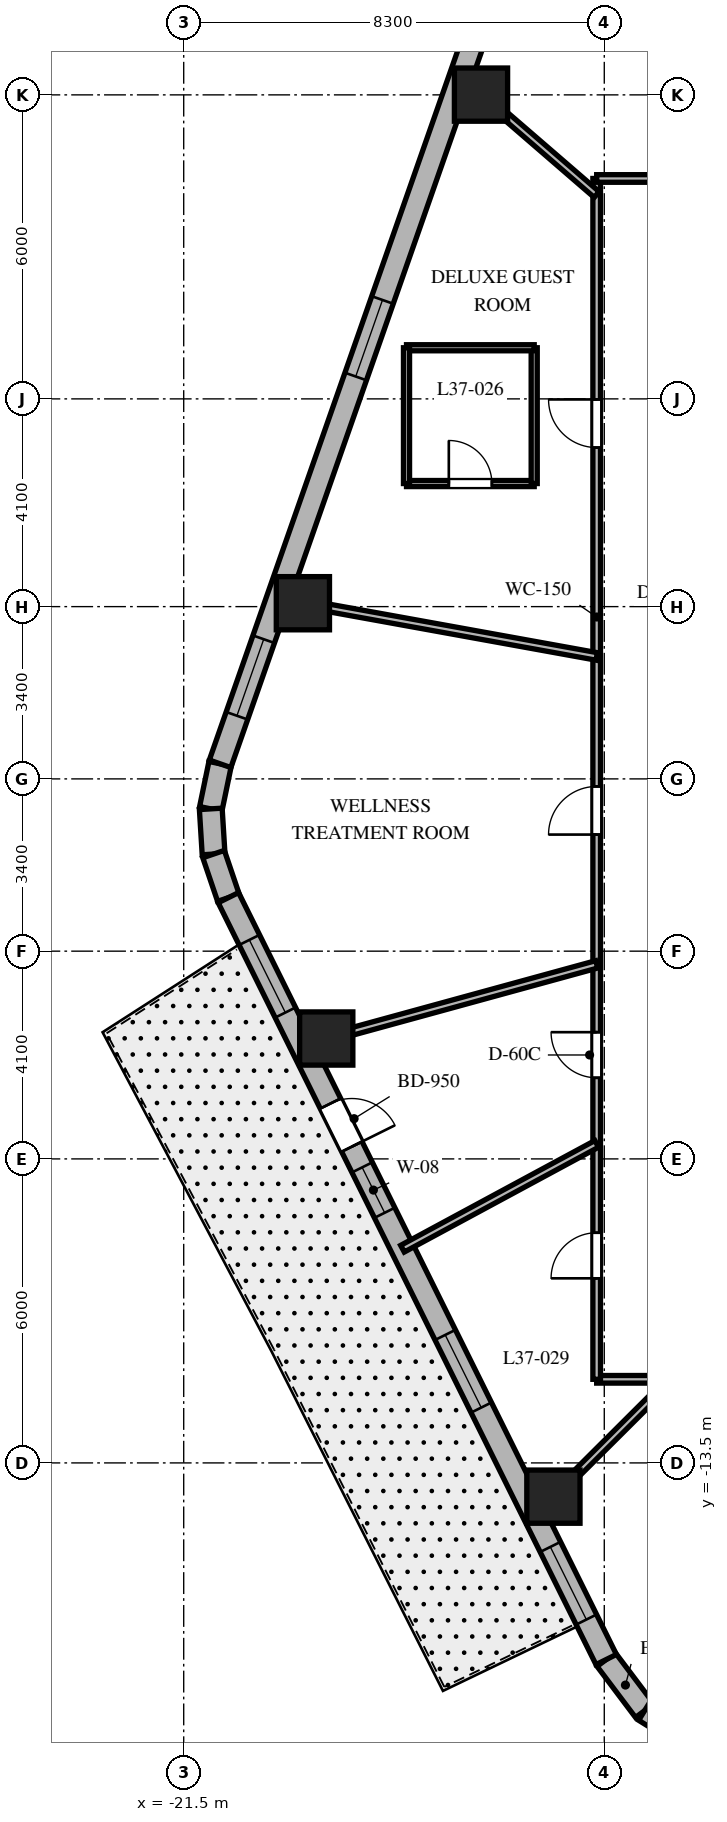
"""IFC4 building model, lengths in metres.
Left out: names, types, materials, properties, quantities, classifications, styles, units other than length and angle.
Written with IfcOpenShell. Run it as: python <this file> out.ifc"""

import sys

from ifc_helpers import new_model, si_unit, direction, frame, frame_2d, origin, origin_2d, place, context, subcontext, project, spatial, rectangle, extrude, element, fill, save


model = new_model("IFC4")
c1 = context("Model", 3, precision=1e-05, world=origin(), true_north=direction((0.0, 1.0)))
c2 = subcontext(c1, "Body", "Model", "MODEL_VIEW")
j1 = project(units=[si_unit("LENGTHUNIT", "METRE"), si_unit("PLANEANGLEUNIT", "RADIAN")], contexts=[c1])
p1 = place(None, origin())
s1 = spatial("IfcSite", under=j1, at=p1, CompositionType="ELEMENT")
p2 = place(p1, origin())
s2 = spatial("IfcBuilding", under=s1, at=p2, CompositionType="ELEMENT")
p3 = place(p2, frame((0.0, 0.0, 151.7)))
s3 = spatial("IfcBuildingStorey", under=s2, at=p3, CompositionType="ELEMENT", Elevation=151.7)
for number, where, z_axis, x_axis in (
    (1, (-15.633, 13.505, 0.0), (0.0, 0.0, 1.0), (1.0, 0.0, 0.0)),
    (2, (-19.148, 3.467, 0.0), (0.0, 0.0, 1.0), (1.0, 0.0, 0.0)),
    (3, (-18.687, -5.124, 0.0), (0.0, 0.0, 1.0), (1.0, 0.0, 0.0)),
    (4, (-14.204, -14.166, 0.0), (0.0, 0.0, 1.0), (1.0, 0.0, 0.0)),
):
    element("IfcColumn", number, at=place(p3, frame(where, z_axis=z_axis, x_axis=x_axis)), inside=s3, PredefinedType="COLUMN", context=c2, shape_type="SweptSolid", body=[
        extrude(rectangle(XDim=1.05, YDim=1.05, at=origin_2d()), origin(), (0.0, 0.0, 1.0), 3.7),
    ])
p4 = place(p3, frame((-13.162, -17.381, 0.0), z_axis=(0.0, 0.0, 1.0), x_axis=(0.601515770517, -0.798860925205, 0.0)))
e5 = element("IfcWall", 5, at=p4, inside=s3, PredefinedType="SOLIDWALL", context=c2, shape_type="SweptSolid", body=[
    extrude(rectangle(XDim=1.262, YDim=0.45, at=frame_2d((0.631, 0.0))), origin(), (0.0, 0.0, 1.0), 3.4),
])
p5 = place(p3, frame((-12.403, -18.389, 0.0), z_axis=(0.0, 0.0, 1.0), x_axis=(0.849795170926, -0.527113049991, 0.0)))
e6 = element("IfcWall", 6, at=p5, inside=s3, PredefinedType="SOLIDWALL", context=c2, shape_type="SweptSolid", body=[
    extrude(rectangle(XDim=1.241, YDim=0.45, at=frame_2d((0.62, 0.0))), origin(), (0.0, 0.0, 1.0), 3.4),
])
p6 = place(p3, frame((-20.782, 0.298, 0.0), z_axis=(0.0, 0.0, 1.0), x_axis=(-0.202570068411, -0.979267771033, 0.0)))
e7 = element("IfcWall", 7, at=p6, inside=s3, PredefinedType="SOLIDWALL", context=c2, shape_type="SweptSolid", body=[
    extrude(rectangle(XDim=0.909, YDim=0.45, at=frame_2d((0.454, 0.0))), origin(), (0.0, 0.0, 1.0), 3.4),
])
p7 = place(p3, frame((-20.966, -0.592, 0.0), z_axis=(0.0, 0.0, 1.0), x_axis=(0.061748898935, -0.998091715966, 0.0)))
e8 = element("IfcWall", 8, at=p7, inside=s3, PredefinedType="SOLIDWALL", context=c2, shape_type="SweptSolid", body=[
    extrude(rectangle(XDim=0.894, YDim=0.45, at=frame_2d((0.447, 0.0))), origin(), (0.0, 0.0, 1.0), 3.4),
])
p8 = place(p3, frame((-20.911, -1.484, 0.0), z_axis=(0.0, 0.0, 1.0), x_axis=(0.321623334353, -0.946867694453, 0.0)))
e9 = element("IfcWall", 9, at=p8, inside=s3, PredefinedType="SOLIDWALL", context=c2, shape_type="SweptSolid", body=[
    extrude(rectangle(XDim=0.909, YDim=0.45, at=frame_2d((0.454, 0.0))), origin(), (0.0, 0.0, 1.0), 3.4),
])
p9 = place(p3, frame((-14.937, 16.993, 0.0), z_axis=(0.0, 0.0, 1.0), x_axis=(-0.330431575061, -0.943829949834, 0.0)))
e10 = element("IfcWall", 10, at=p9, inside=s3, PredefinedType="SOLIDWALL", context=c2, shape_type="SweptSolid", body=[
    extrude(rectangle(XDim=17.689, YDim=0.45, at=frame_2d((8.844, 0.0))), origin(), (0.0, 0.0, 1.0), 3.4),
])
p10 = place(p9, frame((0.95, 0.0, 0.8)))
e11 = element("IfcOpeningElement", 11, at=p10, cuts=e10, PredefinedType="OPENING", context=c2, shape_type="SweptSolid", body=[
    extrude(rectangle(XDim=1.6, YDim=1.75, at=frame_2d((0.8, 0.875))), frame((0.0, 0.235, 0.0), z_axis=(0.0, -1.0, 0.0), x_axis=(1.0, 0.0, 0.0)), (0.0, 0.0, 1.0), 0.47),
])
p11 = place(p9, frame((7.99, 0.0, 0.8)))
e12 = element("IfcOpeningElement", 12, at=p11, cuts=e10, PredefinedType="OPENING", context=c2, shape_type="SweptSolid", body=[
    extrude(rectangle(XDim=1.6, YDim=1.75, at=frame_2d((0.8, 0.875))), frame((0.0, 0.235, 0.0), z_axis=(0.0, -1.0, 0.0), x_axis=(1.0, 0.0, 0.0)), (0.0, 0.0, 1.0), 0.47),
])
p12 = place(p9, frame((15.084, 0.0, 0.8)))
e13 = element("IfcOpeningElement", 13, at=p12, cuts=e10, PredefinedType="OPENING", context=c2, shape_type="SweptSolid", body=[
    extrude(rectangle(XDim=1.6, YDim=1.75, at=frame_2d((0.8, 0.875))), frame((0.0, 0.235, 0.0), z_axis=(0.0, -1.0, 0.0), x_axis=(1.0, 0.0, 0.0)), (0.0, 0.0, 1.0), 0.47),
])
p13 = place(p3, frame((-20.618, -2.344, 0.0), z_axis=(0.0, 0.0, 1.0), x_axis=(0.444243691097, -0.895905990002, 0.0)))
e14 = element("IfcWall", 14, at=p13, inside=s3, PredefinedType="SOLIDWALL", context=c2, shape_type="SweptSolid", body=[
    extrude(rectangle(XDim=16.784, YDim=0.45, at=frame_2d((8.392, 0.0))), origin(), (0.0, 0.0, 1.0), 3.4),
])
p14 = place(p13, frame((4.535, 0.0, 0.0)))
e15 = element("IfcOpeningElement", 15, at=p14, cuts=e14, PredefinedType="OPENING", context=c2, shape_type="SweptSolid", body=[
    extrude(rectangle(XDim=0.95, YDim=2.15, at=frame_2d((0.475, 1.075))), frame((0.0, 0.235, 0.0), z_axis=(0.0, -1.0, 0.0), x_axis=(1.0, 0.0, 0.0)), (0.0, 0.0, 1.0), 0.47),
])
p15 = place(p13, frame((0.931, 0.0, 0.8)))
e16 = element("IfcOpeningElement", 16, at=p15, cuts=e14, PredefinedType="OPENING", context=c2, shape_type="SweptSolid", body=[
    extrude(rectangle(XDim=1.6, YDim=1.75, at=frame_2d((0.8, 0.875))), frame((0.0, 0.235, 0.0), z_axis=(0.0, -1.0, 0.0), x_axis=(1.0, 0.0, 0.0)), (0.0, 0.0, 1.0), 0.47),
])
p16 = place(p13, frame((5.942, 0.0, 0.8)))
e17 = element("IfcOpeningElement", 17, at=p16, cuts=e14, PredefinedType="OPENING", context=c2, shape_type="SweptSolid", body=[
    extrude(rectangle(XDim=1.0, YDim=1.65, at=frame_2d((0.5, 0.825))), frame((0.0, 0.235, 0.0), z_axis=(0.0, -1.0, 0.0), x_axis=(1.0, 0.0, 0.0)), (0.0, 0.0, 1.0), 0.47),
])
p17 = place(p13, frame((9.633, 0.0, 0.8)))
e18 = element("IfcOpeningElement", 18, at=p17, cuts=e14, PredefinedType="OPENING", context=c2, shape_type="SweptSolid", body=[
    extrude(rectangle(XDim=1.6, YDim=1.75, at=frame_2d((0.8, 0.875))), frame((0.0, 0.235, 0.0), z_axis=(0.0, -1.0, 0.0), x_axis=(1.0, 0.0, 0.0)), (0.0, 0.0, 1.0), 0.47),
])
p18 = place(p13, frame((14.303, 0.0, 0.8)))
e19 = element("IfcOpeningElement", 19, at=p18, cuts=e14, PredefinedType="OPENING", context=c2, shape_type="SweptSolid", body=[
    extrude(rectangle(XDim=1.6, YDim=1.75, at=frame_2d((0.8, 0.875))), frame((0.0, 0.235, 0.0), z_axis=(0.0, -1.0, 0.0), x_axis=(1.0, 0.0, 0.0)), (0.0, 0.0, 1.0), 0.47),
])
p19 = place(p3, frame((13.35, -11.85, 0.0), z_axis=(0.0, 0.0, 1.0), x_axis=(-1.0, 0.0, 0.0)))
e20 = element("IfcWall", 20, at=p19, inside=s3, PredefinedType="PARTITIONING", context=c2, shape_type="SweptSolid", body=[
    extrude(rectangle(XDim=26.7, YDim=0.15, at=frame_2d((13.35, 0.0))), origin(), (0.0, 0.0, 1.0), 2.84),
])
p20 = place(p19, frame((20.682, 0.0, 0.0)))
e21 = element("IfcOpeningElement", 21, at=p20, cuts=e20, PredefinedType="OPENING", context=c2, shape_type="SweptSolid", body=[
    extrude(rectangle(XDim=0.95, YDim=2.03, at=frame_2d((0.475, 1.015))), frame((0.0, 0.085, 0.0), z_axis=(0.0, -1.0, 0.0), x_axis=(1.0, 0.0, 0.0)), (0.0, 0.0, 1.0), 0.17),
])
p21 = place(p19, frame((12.362, 0.0, 0.0)))
e22 = element("IfcOpeningElement", 22, at=p21, cuts=e20, PredefinedType="OPENING", context=c2, shape_type="SweptSolid", body=[
    extrude(rectangle(XDim=0.95, YDim=2.03, at=frame_2d((0.475, 1.015))), frame((0.0, 0.085, 0.0), z_axis=(0.0, -1.0, 0.0), x_axis=(1.0, 0.0, 0.0)), (0.0, 0.0, 1.0), 0.17),
])
p22 = place(p19, frame((3.995, 0.0, 0.0)))
e23 = element("IfcOpeningElement", 23, at=p22, cuts=e20, PredefinedType="OPENING", context=c2, shape_type="SweptSolid", body=[
    extrude(rectangle(XDim=0.95, YDim=2.03, at=frame_2d((0.475, 1.015))), frame((0.0, 0.085, 0.0), z_axis=(0.0, -1.0, 0.0), x_axis=(1.0, 0.0, 0.0)), (0.0, 0.0, 1.0), 0.17),
])
p23 = place(p3, frame((-13.35, -11.85, 0.0), z_axis=(0.0, 0.0, 1.0), x_axis=(0.0, 1.0, 0.0)))
e24 = element("IfcWall", 24, at=p23, inside=s3, PredefinedType="PARTITIONING", context=c2, shape_type="SweptSolid", body=[
    extrude(rectangle(XDim=23.7, YDim=0.15, at=frame_2d((11.85, 0.0))), origin(), (0.0, 0.0, 1.0), 2.84),
])
p24 = place(p23, frame((18.389, 0.0, 0.0)))
e25 = element("IfcOpeningElement", 25, at=p24, cuts=e24, PredefinedType="OPENING", context=c2, shape_type="SweptSolid", body=[
    extrude(rectangle(XDim=0.95, YDim=2.03, at=frame_2d((0.475, 1.015))), frame((0.0, 0.085, 0.0), z_axis=(0.0, -1.0, 0.0), x_axis=(1.0, 0.0, 0.0)), (0.0, 0.0, 1.0), 0.17),
])
p25 = place(p23, frame((10.751, 0.0, 0.0)))
e26 = element("IfcOpeningElement", 26, at=p25, cuts=e24, PredefinedType="OPENING", context=c2, shape_type="SweptSolid", body=[
    extrude(rectangle(XDim=0.95, YDim=2.03, at=frame_2d((0.475, 1.015))), frame((0.0, 0.085, 0.0), z_axis=(0.0, -1.0, 0.0), x_axis=(1.0, 0.0, 0.0)), (0.0, 0.0, 1.0), 0.17),
])
p26 = place(p23, frame((5.951, 0.0, 0.0)))
e27 = element("IfcOpeningElement", 27, at=p26, cuts=e24, PredefinedType="OPENING", context=c2, shape_type="SweptSolid", body=[
    extrude(rectangle(XDim=0.9, YDim=2.03, at=frame_2d((0.45, 1.015))), frame((0.0, 0.085, 0.0), z_axis=(0.0, -1.0, 0.0), x_axis=(1.0, 0.0, 0.0)), (0.0, 0.0, 1.0), 0.17),
])
p27 = place(p23, frame((1.993, 0.0, 0.0)))
e28 = element("IfcOpeningElement", 28, at=p27, cuts=e24, PredefinedType="OPENING", context=c2, shape_type="SweptSolid", body=[
    extrude(rectangle(XDim=0.9, YDim=2.03, at=frame_2d((0.45, 1.015))), frame((0.0, 0.085, 0.0), z_axis=(0.0, -1.0, 0.0), x_axis=(1.0, 0.0, 0.0)), (0.0, 0.0, 1.0), 0.17),
])
p28 = place(p3, frame((-13.35, 11.85, 0.0), z_axis=(0.0, 0.0, 1.0), x_axis=(1.0, 0.0, 0.0)))
e29 = element("IfcWall", 29, at=p28, inside=s3, PredefinedType="PARTITIONING", context=c2, shape_type="SweptSolid", body=[
    extrude(rectangle(XDim=26.7, YDim=0.15, at=frame_2d((13.35, 0.0))), origin(), (0.0, 0.0, 1.0), 2.84),
])
p29 = place(p28, frame((20.682, 0.0, 0.0)))
e30 = element("IfcOpeningElement", 30, at=p29, cuts=e29, PredefinedType="OPENING", context=c2, shape_type="SweptSolid", body=[
    extrude(rectangle(XDim=0.95, YDim=2.03, at=frame_2d((0.475, 1.015))), frame((0.0, 0.085, 0.0), z_axis=(0.0, -1.0, 0.0), x_axis=(1.0, 0.0, 0.0)), (0.0, 0.0, 1.0), 0.17),
])
p30 = place(p28, frame((14.229, 0.0, 0.0)))
e31 = element("IfcOpeningElement", 31, at=p30, cuts=e29, PredefinedType="OPENING", context=c2, shape_type="SweptSolid", body=[
    extrude(rectangle(XDim=0.95, YDim=2.03, at=frame_2d((0.475, 1.015))), frame((0.0, 0.085, 0.0), z_axis=(0.0, -1.0, 0.0), x_axis=(1.0, 0.0, 0.0)), (0.0, 0.0, 1.0), 0.17),
])
p31 = place(p28, frame((10.075, 0.0, 0.0)))
e32 = element("IfcOpeningElement", 32, at=p31, cuts=e29, PredefinedType="OPENING", context=c2, shape_type="SweptSolid", body=[
    extrude(rectangle(XDim=0.95, YDim=2.03, at=frame_2d((0.475, 1.015))), frame((0.0, 0.085, 0.0), z_axis=(0.0, -1.0, 0.0), x_axis=(1.0, 0.0, 0.0)), (0.0, 0.0, 1.0), 0.17),
])
p32 = place(p28, frame((3.995, 0.0, 0.0)))
e33 = element("IfcOpeningElement", 33, at=p32, cuts=e29, PredefinedType="OPENING", context=c2, shape_type="SweptSolid", body=[
    extrude(rectangle(XDim=0.95, YDim=2.03, at=frame_2d((0.475, 1.015))), frame((0.0, 0.085, 0.0), z_axis=(0.0, -1.0, 0.0), x_axis=(1.0, 0.0, 0.0)), (0.0, 0.0, 1.0), 0.17),
])
p33 = place(p3, frame((-13.35, 11.533, 0.0), z_axis=(0.0, 0.0, 1.0), x_axis=(-0.756711647314, 0.65374879183, 0.0)))
e34 = element("IfcWall", 34, at=p33, inside=s3, PredefinedType="PARTITIONING", context=c2, shape_type="SweptSolid", body=[
    extrude(rectangle(XDim=3.55, YDim=0.15, at=frame_2d((1.775, 0.0))), origin(), (0.0, 0.0, 1.0), 2.64),
])
p34 = place(p3, frame((-13.35, 2.417, 0.0), z_axis=(0.0, 0.0, 1.0), x_axis=(-0.98399796473, 0.178179699761, 0.0)))
e35 = element("IfcWall", 35, at=p34, inside=s3, PredefinedType="PARTITIONING", context=c2, shape_type="SweptSolid", body=[
    extrude(rectangle(XDim=6.393, YDim=0.15, at=frame_2d((3.197, 0.0))), origin(), (0.0, 0.0, 1.0), 2.64),
])
p35 = place(p3, frame((-13.35, -3.661, 0.0), z_axis=(0.0, 0.0, 1.0), x_axis=(-0.964397145454, -0.264458211898, 0.0)))
e36 = element("IfcWall", 36, at=p35, inside=s3, PredefinedType="PARTITIONING", context=c2, shape_type="SweptSolid", body=[
    extrude(rectangle(XDim=6.039, YDim=0.15, at=frame_2d((3.019, 0.0))), origin(), (0.0, 0.0, 1.0), 2.64),
])
p36 = place(p3, frame((-13.35, -7.204, 0.0), z_axis=(0.0, 0.0, 1.0), x_axis=(-0.880033329067, -0.474911928394, 0.0)))
e37 = element("IfcWall", 37, at=p36, inside=s3, PredefinedType="PARTITIONING", context=c2, shape_type="SweptSolid", body=[
    extrude(rectangle(XDim=4.355, YDim=0.15, at=frame_2d((2.178, 0.0))), origin(), (0.0, 0.0, 1.0), 2.64),
])
p37 = place(p3, frame((-11.882, -11.85, 0.0), z_axis=(0.0, 0.0, 1.0), x_axis=(-0.708037373639, -0.706174962407, 0.0)))
e38 = element("IfcWall", 38, at=p37, inside=s3, PredefinedType="PARTITIONING", context=c2, shape_type="SweptSolid", body=[
    extrude(rectangle(XDim=3.802, YDim=0.15, at=frame_2d((1.901, 0.0))), origin(), (0.0, 0.0, 1.0), 2.64),
])
p38 = place(p3, frame((-17.103, 5.829, 0.0), z_axis=(0.0, 0.0, 1.0), x_axis=(1.0, 0.0, 0.0)))
e39 = element("IfcWall", 39, at=p38, inside=s3, PredefinedType="PARTITIONING", context=c2, shape_type="SweptSolid", body=[
    extrude(rectangle(XDim=2.52, YDim=0.12, at=frame_2d((1.26, 0.0))), origin(), (0.0, 0.0, 1.0), 2.972),
])
p39 = place(p38, frame((0.835, 0.0, 0.0)))
e40 = element("IfcOpeningElement", 40, at=p39, cuts=e39, PredefinedType="OPENING", context=c2, shape_type="SweptSolid", body=[
    extrude(rectangle(XDim=0.85, YDim=2.03, at=frame_2d((0.425, 1.015))), frame((0.0, 0.07, 0.0), z_axis=(0.0, -1.0, 0.0), x_axis=(1.0, 0.0, 0.0)), (0.0, 0.0, 1.0), 0.14),
])
p40 = place(p3, frame((-14.583, 5.829, 0.0), z_axis=(0.0, 0.0, 1.0), x_axis=(0.0, 1.0, 0.0)))
e41 = element("IfcWall", 41, at=p40, inside=s3, PredefinedType="PARTITIONING", context=c2, shape_type="SweptSolid", body=[
    extrude(rectangle(XDim=2.68, YDim=0.12, at=frame_2d((1.34, 0.0))), origin(), (0.0, 0.0, 1.0), 2.972),
])
p41 = place(p3, frame((-14.583, 8.509, 0.0), z_axis=(0.0, 0.0, 1.0), x_axis=(-1.0, 0.0, 0.0)))
e42 = element("IfcWall", 42, at=p41, inside=s3, PredefinedType="PARTITIONING", context=c2, shape_type="SweptSolid", body=[
    extrude(rectangle(XDim=2.52, YDim=0.12, at=frame_2d((1.26, 0.0))), origin(), (0.0, 0.0, 1.0), 2.972),
])
p42 = place(p3, frame((-17.103, 8.509, 0.0), z_axis=(0.0, 0.0, 1.0), x_axis=(0.0, -1.0, 0.0)))
e43 = element("IfcWall", 43, at=p42, inside=s3, PredefinedType="PARTITIONING", context=c2, shape_type="SweptSolid", body=[
    extrude(rectangle(XDim=2.68, YDim=0.12, at=frame_2d((1.34, 0.0))), origin(), (0.0, 0.0, 1.0), 2.64),
])
p43 = place(p11, origin())
e44 = element("IfcWindow", 44, at=p43, inside=s3, PartitioningType="SINGLE_PANEL", PredefinedType="WINDOW", context=c2, shape_type="SweptSolid", body=[
    extrude(rectangle(XDim=1.6, YDim=1.75, at=frame_2d((0.8, 0.875))), frame((0.0, 0.03, 0.0), z_axis=(0.0, -1.0, 0.0), x_axis=(1.0, 0.0, 0.0)), (0.0, 0.0, 1.0), 0.06),
])
fill(e12, e44)
p44 = place(p12, origin())
e45 = element("IfcWindow", 45, at=p44, inside=s3, PartitioningType="SINGLE_PANEL", PredefinedType="WINDOW", context=c2, shape_type="SweptSolid", body=[
    extrude(rectangle(XDim=1.6, YDim=1.75, at=frame_2d((0.8, 0.875))), frame((0.0, 0.03, 0.0), z_axis=(0.0, -1.0, 0.0), x_axis=(1.0, 0.0, 0.0)), (0.0, 0.0, 1.0), 0.06),
])
fill(e13, e45)
p45 = place(p14, origin())
e46 = element("IfcDoor", 46, at=p45, inside=s3, OperationType="SINGLE_SWING_RIGHT", PredefinedType="DOOR", context=c2, shape_type="SweptSolid", body=[
    extrude(rectangle(XDim=0.95, YDim=2.15, at=frame_2d((0.475, 1.075))), frame((0.0, 0.025, 0.0), z_axis=(0.0, -1.0, 0.0), x_axis=(1.0, 0.0, 0.0)), (0.0, 0.0, 1.0), 0.05),
])
fill(e15, e46)
p46 = place(p15, origin())
e47 = element("IfcWindow", 47, at=p46, inside=s3, PartitioningType="SINGLE_PANEL", PredefinedType="WINDOW", context=c2, shape_type="SweptSolid", body=[
    extrude(rectangle(XDim=1.6, YDim=1.75, at=frame_2d((0.8, 0.875))), frame((0.0, 0.03, 0.0), z_axis=(0.0, -1.0, 0.0), x_axis=(1.0, 0.0, 0.0)), (0.0, 0.0, 1.0), 0.06),
])
fill(e16, e47)
p47 = place(p16, origin())
e48 = element("IfcWindow", 48, at=p47, inside=s3, PartitioningType="SINGLE_PANEL", PredefinedType="WINDOW", context=c2, shape_type="SweptSolid", body=[
    extrude(rectangle(XDim=1.0, YDim=1.65, at=frame_2d((0.5, 0.825))), frame((0.0, 0.03, 0.0), z_axis=(0.0, -1.0, 0.0), x_axis=(1.0, 0.0, 0.0)), (0.0, 0.0, 1.0), 0.06),
])
fill(e17, e48)
p48 = place(p17, origin())
e49 = element("IfcWindow", 49, at=p48, inside=s3, PartitioningType="SINGLE_PANEL", PredefinedType="WINDOW", context=c2, shape_type="SweptSolid", body=[
    extrude(rectangle(XDim=1.6, YDim=1.75, at=frame_2d((0.8, 0.875))), frame((0.0, 0.03, 0.0), z_axis=(0.0, -1.0, 0.0), x_axis=(1.0, 0.0, 0.0)), (0.0, 0.0, 1.0), 0.06),
])
fill(e18, e49)
p49 = place(p18, origin())
e50 = element("IfcWindow", 50, at=p49, inside=s3, PartitioningType="SINGLE_PANEL", PredefinedType="WINDOW", context=c2, shape_type="SweptSolid", body=[
    extrude(rectangle(XDim=1.6, YDim=1.75, at=frame_2d((0.8, 0.875))), frame((0.0, 0.03, 0.0), z_axis=(0.0, -1.0, 0.0), x_axis=(1.0, 0.0, 0.0)), (0.0, 0.0, 1.0), 0.06),
])
fill(e19, e50)
p50 = place(p24, origin())
e51 = element("IfcDoor", 51, at=p50, inside=s3, OperationType="SINGLE_SWING_RIGHT", PredefinedType="DOOR", context=c2, shape_type="SweptSolid", body=[
    extrude(rectangle(XDim=0.95, YDim=2.03, at=frame_2d((0.475, 1.015))), frame((0.0, 0.025, 0.0), z_axis=(0.0, -1.0, 0.0), x_axis=(1.0, 0.0, 0.0)), (0.0, 0.0, 1.0), 0.05),
])
fill(e25, e51)
p51 = place(p39, origin())
e52 = element("IfcDoor", 52, at=p51, inside=s3, OperationType="SINGLE_SWING_LEFT", PredefinedType="DOOR", context=c2, shape_type="SweptSolid", body=[
    extrude(rectangle(XDim=0.85, YDim=2.03, at=frame_2d((0.425, 1.015))), frame((0.0, 0.025, 0.0), z_axis=(0.0, -1.0, 0.0), x_axis=(1.0, 0.0, 0.0)), (0.0, 0.0, 1.0), 0.05),
])
fill(e40, e52)
p52 = place(p25, origin())
e53 = element("IfcDoor", 53, at=p52, inside=s3, OperationType="SINGLE_SWING_LEFT", PredefinedType="DOOR", context=c2, shape_type="SweptSolid", body=[
    extrude(rectangle(XDim=0.95, YDim=2.03, at=frame_2d((0.475, 1.015))), frame((0.0, 0.025, 0.0), z_axis=(0.0, -1.0, 0.0), x_axis=(1.0, 0.0, 0.0)), (0.0, 0.0, 1.0), 0.05),
])
fill(e26, e53)
p53 = place(p26, origin())
e54 = element("IfcDoor", 54, at=p53, inside=s3, OperationType="SINGLE_SWING_RIGHT", PredefinedType="DOOR", context=c2, shape_type="SweptSolid", body=[
    extrude(rectangle(XDim=0.9, YDim=2.03, at=frame_2d((0.45, 1.015))), frame((0.0, 0.025, 0.0), z_axis=(0.0, -1.0, 0.0), x_axis=(1.0, 0.0, 0.0)), (0.0, 0.0, 1.0), 0.05),
])
fill(e27, e54)
p54 = place(p27, origin())
e55 = element("IfcDoor", 55, at=p54, inside=s3, OperationType="SINGLE_SWING_LEFT", PredefinedType="DOOR", context=c2, shape_type="SweptSolid", body=[
    extrude(rectangle(XDim=0.9, YDim=2.03, at=frame_2d((0.45, 1.015))), frame((0.0, 0.025, 0.0), z_axis=(0.0, -1.0, 0.0), x_axis=(1.0, 0.0, 0.0)), (0.0, 0.0, 1.0), 0.05),
])
fill(e28, e55)
save(model, sys.argv[1])
